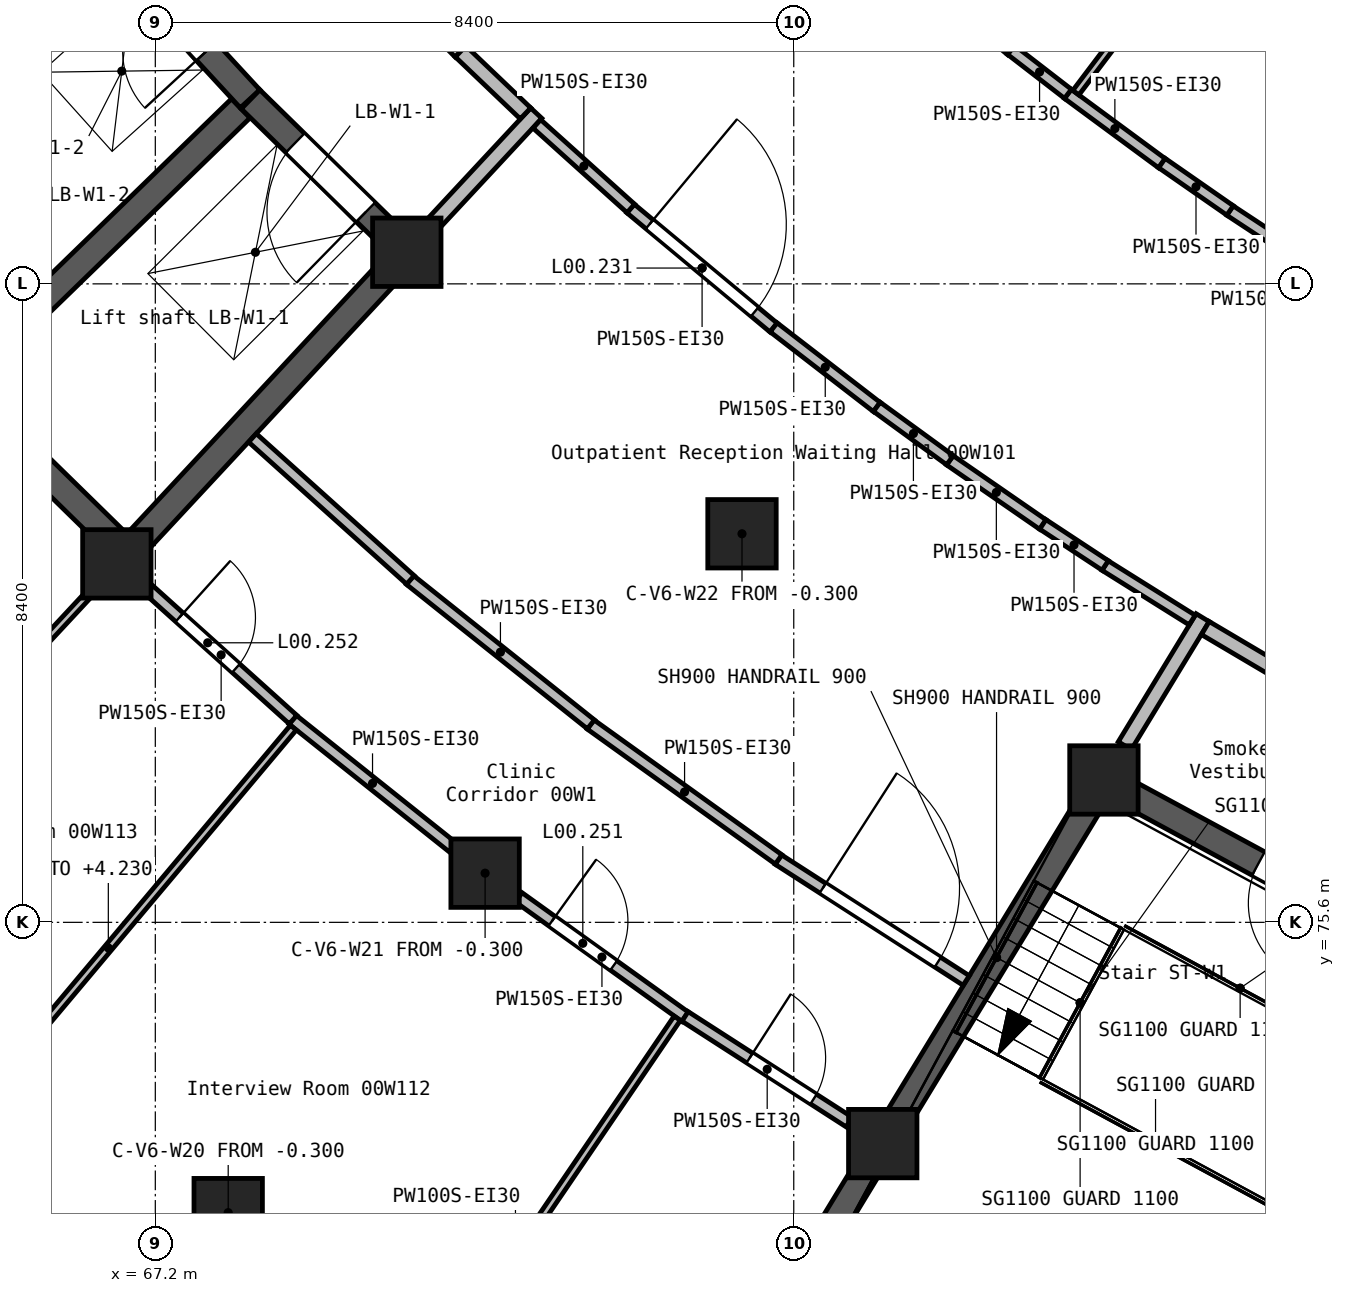
"""IFC4 building model, lengths in metres.
Left out: names, types, materials, properties, quantities, classifications, styles, units other than length and angle.
Written with IfcOpenShell. Run it as: python <this file> out.ifc"""

import sys

from ifc_helpers import new_model, si_unit, direction, frame, frame_2d, origin, origin_2d, place, context, subcontext, project, spatial, rectangle, extrude, element, fill, save


model = new_model("IFC4")
c1 = context("Model", 3, precision=1e-05, world=origin(), true_north=direction((0.0, 1.0)))
c2 = subcontext(c1, "Body", "Model", "MODEL_VIEW")
j1 = project(units=[si_unit("LENGTHUNIT", "METRE"), si_unit("PLANEANGLEUNIT", "RADIAN")], contexts=[c1])
p1 = place(None, origin())
s1 = spatial("IfcSite", under=j1, at=p1, CompositionType="ELEMENT")
p2 = place(p1, origin())
s2 = spatial("IfcBuilding", under=s1, at=p2, CompositionType="ELEMENT")
p3 = place(p2, origin())
s3 = spatial("IfcBuildingStorey", under=s2, at=p3, CompositionType="ELEMENT", Elevation=0.0)
for number, where, z_axis, x_axis in (
    (1, (66.694, 80.316, -0.3), (0.0, 0.0, 1.0), (1.0, 0.0, 0.0)),
    (2, (68.159, 71.781, -0.3), (0.0, 0.0, 1.0), (1.0, 0.0, 0.0)),
    (3, (70.509, 84.416, -0.3), (0.0, 0.0, 1.0), (1.0, 0.0, 0.0)),
    (4, (71.539, 76.247, -0.3), (0.0, 0.0, 1.0), (1.0, 0.0, 0.0)),
    (5, (74.919, 80.712, -0.3), (0.0, 0.0, 1.0), (1.0, 0.0, 0.0)),
    (6, (76.771, 72.689, -0.3), (0.0, 0.0, 1.0), (1.0, 0.0, 0.0)),
    (7, (79.681, 77.473, -0.3), (0.0, 0.0, 1.0), (1.0, 0.0, 0.0)),
):
    element("IfcColumn", number, at=place(p3, frame(where, z_axis=z_axis, x_axis=x_axis)), inside=s3, PredefinedType="COLUMN", context=c2, shape_type="SweptSolid", body=[
        extrude(rectangle(XDim=0.9, YDim=0.9, at=origin_2d()), origin(), (0.0, 0.0, 1.0), 5.7),
    ])
p4 = place(p3, frame((62.305, 84.872, -0.3), z_axis=(0.0, 0.0, 1.0), x_axis=(0.751808220443, 0.659381831471, 0.0)))
e8 = element("IfcWall", 8, at=p4, inside=s3, PredefinedType="SHEAR", context=c2, shape_type="SweptSolid", body=[
    extrude(rectangle(XDim=5.75, YDim=0.35, at=frame_2d((2.875, 0.0))), origin(), (0.0, 0.0, 1.0), 5.7),
])
p5 = place(p3, frame((64.579, 82.666, -0.3), z_axis=(0.0, 0.0, 1.0), x_axis=(0.714695816666, -0.699435407769, 0.0)))
e9 = element("IfcWall", 9, at=p5, inside=s3, PredefinedType="SHEAR", context=c2, shape_type="SweptSolid", body=[
    extrude(rectangle(XDim=2.976, YDim=0.35, at=frame_2d((1.488, 0.0))), origin(), (0.0, 0.0, 1.0), 5.7),
])
p6 = place(p3, frame((64.702, 82.791, -0.3), z_axis=(0.0, 0.0, 1.0), x_axis=(0.717400873641, 0.696660596345, 0.0)))
e10 = element("IfcWall", 10, at=p6, inside=s3, PredefinedType="SHEAR", context=c2, shape_type="SweptSolid", body=[
    extrude(rectangle(XDim=5.05, YDim=0.35, at=frame_2d((2.525, 0.0))), origin(), (0.0, 0.0, 1.0), 5.7),
])
p7 = place(p3, frame((66.712, 80.334, -0.3), z_axis=(0.0, 0.0, 1.0), x_axis=(0.681084356202, 0.732204957465, 0.0)))
e11 = element("IfcWall", 11, at=p7, inside=s3, PredefinedType="SHEAR", context=c2, shape_type="SweptSolid", body=[
    extrude(rectangle(XDim=5.75, YDim=0.35, at=frame_2d((2.875, 0.0))), origin(), (0.0, 0.0, 1.0), 5.7),
])
p8 = place(p3, frame((68.447, 86.434, -0.3), z_axis=(0.0, 0.0, 1.0), x_axis=(-0.678058558992, 0.735007884704, 0.0)))
e12 = element("IfcWall", 12, at=p8, inside=s3, PredefinedType="SHEAR", context=c2, shape_type="SweptSolid", body=[
    extrude(rectangle(XDim=2.701, YDim=0.35, at=frame_2d((1.35, 0.0))), origin(), (0.0, 0.0, 1.0), 5.7),
])
p9 = place(p8, frame((0.85, 0.0, 0.3)))
e13 = element("IfcOpeningElement", 13, at=p9, cuts=e12, PredefinedType="OPENING", context=c2, shape_type="SweptSolid", body=[
    extrude(rectangle(XDim=1.1, YDim=2.1, at=frame_2d((0.55, 1.05))), frame((0.0, 0.185, 0.0), z_axis=(0.0, -1.0, 0.0), x_axis=(1.0, 0.0, 0.0)), (0.0, 0.0, 1.0), 0.37),
])
p10 = place(p3, frame((70.384, 84.538, -0.3), z_axis=(0.0, 0.0, 1.0), x_axis=(-0.714701443082, 0.699429658548, 0.0)))
e14 = element("IfcWall", 14, at=p10, inside=s3, PredefinedType="SHEAR", context=c2, shape_type="SweptSolid", body=[
    extrude(rectangle(XDim=2.702, YDim=0.35, at=frame_2d((1.351, 0.0))), origin(), (0.0, 0.0, 1.0), 5.7),
])
p11 = place(p10, frame((0.581, 0.0, 0.3)))
e15 = element("IfcOpeningElement", 15, at=p11, cuts=e14, PredefinedType="OPENING", context=c2, shape_type="SweptSolid", body=[
    extrude(rectangle(XDim=1.3, YDim=2.1, at=frame_2d((0.65, 1.05))), frame((0.0, 0.185, 0.0), z_axis=(0.0, -1.0, 0.0), x_axis=(1.0, 0.0, 0.0)), (0.0, 0.0, 1.0), 0.37),
])
p12 = place(p3, frame((75.848, 71.173, -0.3), z_axis=(0.0, 0.0, 1.0), x_axis=(0.51973149438, 0.854329663391, 0.0)))
e16 = element("IfcWall", 16, at=p12, inside=s3, PredefinedType="SHEAR", context=c2, shape_type="SweptSolid", body=[
    extrude(rectangle(XDim=7.55, YDim=0.35, at=frame_2d((3.775, 0.0))), origin(), (0.0, 0.0, 1.0), 5.7),
])
p13 = place(p3, frame((81.572, 68.077, -0.3), z_axis=(0.0, 0.0, 1.0), x_axis=(0.430592498036, 0.90254645345, 0.0)))
e17 = element("IfcWall", 17, at=p13, inside=s3, PredefinedType="SHEAR", context=c2, shape_type="SweptSolid", body=[
    extrude(rectangle(XDim=7.55, YDim=0.35, at=frame_2d((3.775, 0.0))), origin(), (0.0, 0.0, 1.0), 5.7),
])
p14 = place(p3, frame((84.593, 74.816, -0.3), z_axis=(0.0, 0.0, 1.0), x_axis=(-0.879585553739, 0.475740742058, 0.0)))
e18 = element("IfcWall", 18, at=p14, inside=s3, PredefinedType="SHEAR", context=c2, shape_type="SweptSolid", body=[
    extrude(rectangle(XDim=5.409, YDim=0.35, at=frame_2d((2.705, 0.0))), origin(), (0.0, 0.0, 1.0), 5.7),
])
p15 = place(p14, frame((2.174, 0.0, 0.3)))
e19 = element("IfcOpeningElement", 19, at=p15, cuts=e18, PredefinedType="OPENING", context=c2, shape_type="SweptSolid", body=[
    extrude(rectangle(XDim=1.1, YDim=2.1, at=frame_2d((0.55, 1.05))), frame((0.0, 0.185, 0.0), z_axis=(0.0, -1.0, 0.0), x_axis=(1.0, 0.0, 0.0)), (0.0, 0.0, 1.0), 0.37),
])
p16 = place(p3, frame((70.837, 84.769, 0.0), z_axis=(0.0, 0.0, 1.0), x_axis=(0.681244203436, 0.732056237789, 0.0)))
e20 = element("IfcWall", 20, at=p16, inside=s3, PredefinedType="SOLIDWALL", context=c2, shape_type="SweptSolid", body=[
    extrude(rectangle(XDim=2.018, YDim=0.2, at=frame_2d((1.009, 0.0))), origin(), (0.0, 0.0, 1.0), 5.05),
])
p17 = place(p3, frame((79.955, 77.924, 0.0), z_axis=(0.0, 0.0, 1.0), x_axis=(0.519675881268, 0.85436349315, 0.0)))
e21 = element("IfcWall", 21, at=p17, inside=s3, PredefinedType="SOLIDWALL", context=c2, shape_type="SweptSolid", body=[
    extrude(rectangle(XDim=1.972, YDim=0.2, at=frame_2d((0.986, 0.0))), origin(), (0.0, 0.0, 1.0), 5.05),
])
p18 = place(p3, frame((70.101, 88.174, 0.0), z_axis=(0.0, 0.0, 1.0), x_axis=(0.705714994949, -0.708495833371, 0.0)))
e22 = element("IfcWall", 22, at=p18, inside=s3, PredefinedType="SOLIDWALL", context=c2, shape_type="SweptSolid", body=[
    extrude(rectangle(XDim=1.58, YDim=0.2, at=frame_2d((0.79, 0.0))), origin(), (0.0, 0.0, 1.0), 5.05),
])
p19 = place(p18, frame((0.19, 0.0, 0.0)))
e23 = element("IfcOpeningElement", 23, at=p19, cuts=e22, PredefinedType="OPENING", context=c2, shape_type="SweptSolid", body=[
    extrude(rectangle(XDim=1.2, YDim=2.1, at=frame_2d((0.6, 1.05))), frame((0.0, 0.11, 0.0), z_axis=(0.0, -1.0, 0.0), x_axis=(1.0, 0.0, 0.0)), (0.0, 0.0, 1.0), 0.22),
])
p20 = place(p3, frame((81.015, 79.471, 0.0), z_axis=(0.0, 0.0, 1.0), x_axis=(0.860926528214, -0.508729312127, 0.0)))
e24 = element("IfcWall", 24, at=p20, inside=s3, PredefinedType="SOLIDWALL", context=c2, shape_type="SweptSolid", body=[
    extrude(rectangle(XDim=1.379, YDim=0.2, at=frame_2d((0.689, 0.0))), origin(), (0.0, 0.0, 1.0), 5.05),
])
p21 = place(p3, frame((71.217, 87.058, 0.0), z_axis=(0.0, 0.0, 1.0), x_axis=(0.723660671666, -0.6901559478, 0.0)))
e25 = element("IfcWall", 25, at=p21, inside=s3, PredefinedType="SOLIDWALL", context=c2, shape_type="SweptSolid", body=[
    extrude(rectangle(XDim=1.18, YDim=0.2, at=frame_2d((0.59, 0.0))), origin(), (0.0, 0.0, 1.0), 5.05),
])
p22 = place(p3, frame((71.982, 75.929, 0.0), z_axis=(0.0, 0.0, 1.0), x_axis=(0.812329236441, -0.583199118332, 0.0)))
e26 = element("IfcWall", 26, at=p22, inside=s3, PredefinedType="PARTITIONING", context=c2, shape_type="SweptSolid", body=[
    extrude(rectangle(XDim=2.695, YDim=0.15, at=frame_2d((1.347, 0.0))), origin(), (0.0, 0.0, 1.0), 5.05),
])
p23 = place(p22, frame((0.537, 0.0, 0.0)))
e27 = element("IfcOpeningElement", 27, at=p23, cuts=e26, PredefinedType="OPENING", context=c2, shape_type="SweptSolid", body=[
    extrude(rectangle(XDim=1.0, YDim=2.1, at=frame_2d((0.5, 1.05))), frame((0.0, 0.085, 0.0), z_axis=(0.0, -1.0, 0.0), x_axis=(1.0, 0.0, 0.0)), (0.0, 0.0, 1.0), 0.17),
])
p24 = place(p3, frame((69.006, 78.267, 0.0), z_axis=(0.0, 0.0, 1.0), x_axis=(0.781841800916, -0.623476862715, 0.0)))
e28 = element("IfcWall", 28, at=p24, inside=s3, PredefinedType="PARTITIONING", context=c2, shape_type="SweptSolid", body=[
    extrude(rectangle(XDim=2.69, YDim=0.15, at=frame_2d((1.345, 0.0))), origin(), (0.0, 0.0, 1.0), 5.05),
])
p25 = place(p3, frame((74.17, 74.362, 0.0), z_axis=(0.0, 0.0, 1.0), x_axis=(0.840928399131, -0.541146401203, 0.0)))
e29 = element("IfcWall", 29, at=p25, inside=s3, PredefinedType="PARTITIONING", context=c2, shape_type="SweptSolid", body=[
    extrude(rectangle(XDim=2.57, YDim=0.15, at=frame_2d((1.285, 0.0))), origin(), (0.0, 0.0, 1.0), 5.05),
])
p26 = place(p25, frame((1.01, 0.0, 0.0)))
e30 = element("IfcOpeningElement", 30, at=p26, cuts=e29, PredefinedType="OPENING", context=c2, shape_type="SweptSolid", body=[
    extrude(rectangle(XDim=1.0, YDim=2.1, at=frame_2d((0.5, 1.05))), frame((0.0, 0.085, 0.0), z_axis=(0.0, -1.0, 0.0), x_axis=(1.0, 0.0, 0.0)), (0.0, 0.0, 1.0), 0.17),
])
p27 = place(p3, frame((67.12, 79.971, 0.0), z_axis=(0.0, 0.0, 1.0), x_axis=(0.743284610851, -0.668975326355, 0.0)))
e31 = element("IfcWall", 31, at=p27, inside=s3, PredefinedType="PARTITIONING", context=c2, shape_type="SweptSolid", body=[
    extrude(rectangle(XDim=2.546, YDim=0.15, at=frame_2d((1.273, 0.0))), origin(), (0.0, 0.0, 1.0), 5.05),
])
p28 = place(p27, frame((0.535, 0.0, 0.0)))
e32 = element("IfcOpeningElement", 32, at=p28, cuts=e31, PredefinedType="OPENING", context=c2, shape_type="SweptSolid", body=[
    extrude(rectangle(XDim=1.0, YDim=2.1, at=frame_2d((0.5, 1.05))), frame((0.0, 0.085, 0.0), z_axis=(0.0, -1.0, 0.0), x_axis=(1.0, 0.0, 0.0)), (0.0, 0.0, 1.0), 0.17),
])
p29 = place(p3, frame((75.396, 76.427, 0.0), z_axis=(0.0, 0.0, 1.0), x_axis=(0.840919451001, -0.541160306128, 0.0)))
e33 = element("IfcWall", 33, at=p29, inside=s3, PredefinedType="PARTITIONING", context=c2, shape_type="SweptSolid", body=[
    extrude(rectangle(XDim=2.941, YDim=0.15, at=frame_2d((1.47, 0.0))), origin(), (0.0, 0.0, 1.0), 5.05),
])
p30 = place(p29, frame((0.697, 0.0, 0.0)))
e34 = element("IfcOpeningElement", 34, at=p30, cuts=e33, PredefinedType="OPENING", context=c2, shape_type="SweptSolid", body=[
    extrude(rectangle(XDim=1.8, YDim=2.1, at=frame_2d((0.9, 1.05))), frame((0.0, 0.085, 0.0), z_axis=(0.0, -1.0, 0.0), x_axis=(1.0, 0.0, 0.0)), (0.0, 0.0, 1.0), 0.17),
])
for number, where, z_axis, x_axis in (
    (35, (72.926, 78.204, 0.0), (0.0, 0.0, 1.0), (0.812, -0.583, 0.0)),
    (36, (70.55, 80.105, 0.0), (0.0, 0.0, 1.0), (0.782, -0.624, 0.0)),
):
    element("IfcWall", number, at=place(p3, frame(where, z_axis=z_axis, x_axis=x_axis)), inside=s3, PredefinedType="PARTITIONING", context=c2, shape_type="SweptSolid", body=[
        extrude(rectangle(XDim=3.046, YDim=0.15, at=frame_2d((1.523, 0.0))), origin(), (0.0, 0.0, 1.0), 5.05),
    ])
p31 = place(p3, frame((68.478, 81.974, 0.0), z_axis=(0.0, 0.0, 1.0), x_axis=(0.743546016741, -0.66868476952, 0.0)))
e37 = element("IfcWall", 37, at=p31, inside=s3, PredefinedType="PARTITIONING", context=c2, shape_type="SweptSolid", body=[
    extrude(rectangle(XDim=2.795, YDim=0.15, at=frame_2d((1.397, 0.0))), origin(), (0.0, 0.0, 1.0), 5.05),
])
p32 = place(p3, frame((73.452, 84.992, 0.0), z_axis=(0.0, 0.0, 1.0), x_axis=(0.768531506517, -0.639811943849, 0.0)))
e38 = element("IfcWall", 38, at=p32, inside=s3, PredefinedType="PARTITIONING", context=c2, shape_type="SweptSolid", body=[
    extrude(rectangle(XDim=2.45, YDim=0.15, at=frame_2d((1.225, 0.0))), origin(), (0.0, 0.0, 1.0), 5.05),
])
p33 = place(p32, frame((0.325, 0.0, 0.0)))
e39 = element("IfcOpeningElement", 39, at=p33, cuts=e38, PredefinedType="OPENING", context=c2, shape_type="SweptSolid", body=[
    extrude(rectangle(XDim=1.8, YDim=2.1, at=frame_2d((0.9, 1.05))), frame((0.0, 0.085, 0.0), z_axis=(0.0, -1.0, 0.0), x_axis=(1.0, 0.0, 0.0)), (0.0, 0.0, 1.0), 0.17),
])
p34 = place(p3, frame((72.22, 86.105, 0.0), z_axis=(0.0, 0.0, 1.0), x_axis=(0.743337937966, -0.668916070954, 0.0)))
e40 = element("IfcWall", 40, at=p34, inside=s3, PredefinedType="PARTITIONING", context=c2, shape_type="SweptSolid", body=[
    extrude(rectangle(XDim=1.663, YDim=0.15, at=frame_2d((0.832, 0.0))), origin(), (0.0, 0.0, 1.0), 5.05),
])
p35 = place(p3, frame((77.051, 88.236, 0.0), z_axis=(0.0, 0.0, 1.0), x_axis=(0.771517511576, -0.636208086502, 0.0)))
e41 = element("IfcWall", 41, at=p35, inside=s3, PredefinedType="PARTITIONING", context=c2, shape_type="SweptSolid", body=[
    extrude(rectangle(XDim=1.828, YDim=0.15, at=frame_2d((0.914, 0.0))), origin(), (0.0, 0.0, 1.0), 5.05),
])
p36 = place(p3, frame((75.335, 83.428, 0.0), z_axis=(0.0, 0.0, 1.0), x_axis=(0.791538398042, -0.611119435483, 0.0)))
e42 = element("IfcWall", 42, at=p36, inside=s3, PredefinedType="PARTITIONING", context=c2, shape_type="SweptSolid", body=[
    extrude(rectangle(XDim=1.716, YDim=0.15, at=frame_2d((0.858, 0.0))), origin(), (0.0, 0.0, 1.0), 5.05),
])
p37 = place(p3, frame((79.206, 86.5, 0.0), z_axis=(0.0, 0.0, 1.0), x_axis=(0.804960127747, -0.593328907721, 0.0)))
e43 = element("IfcWall", 43, at=p37, inside=s3, PredefinedType="PARTITIONING", context=c2, shape_type="SweptSolid", body=[
    extrude(rectangle(XDim=1.539, YDim=0.15, at=frame_2d((0.77, 0.0))), origin(), (0.0, 0.0, 1.0), 5.05),
])
p38 = place(p3, frame((79.695, 80.295, 0.0), z_axis=(0.0, 0.0, 1.0), x_axis=(0.847541618724, -0.530728936964, 0.0)))
e44 = element("IfcWall", 44, at=p38, inside=s3, PredefinedType="PARTITIONING", context=c2, shape_type="SweptSolid", body=[
    extrude(rectangle(XDim=1.353, YDim=0.15, at=frame_2d((0.676, 0.0))), origin(), (0.0, 0.0, 1.0), 5.05),
])
p39 = place(p3, frame((77.653, 81.68, 0.0), z_axis=(0.0, 0.0, 1.0), x_axis=(0.822646640465, -0.568552992194, 0.0)))
e45 = element("IfcWall", 45, at=p39, inside=s3, PredefinedType="PARTITIONING", context=c2, shape_type="SweptSolid", body=[
    extrude(rectangle(XDim=1.488, YDim=0.15, at=frame_2d((0.744, 0.0))), origin(), (0.0, 0.0, 1.0), 5.05),
])
p40 = place(p3, frame((76.693, 82.382, 0.0), z_axis=(0.0, 0.0, 1.0), x_axis=(0.808088805309, -0.589060678312, 0.0)))
e46 = element("IfcWall", 46, at=p40, inside=s3, PredefinedType="PARTITIONING", context=c2, shape_type="SweptSolid", body=[
    extrude(rectangle(XDim=1.192, YDim=0.15, at=frame_2d((0.596, 0.0))), origin(), (0.0, 0.0, 1.0), 5.05),
])
p41 = place(p3, frame((81.338, 84.965, 0.0), z_axis=(0.0, 0.0, 1.0), x_axis=(0.834958204617, -0.550313362134, 0.0)))
e47 = element("IfcWall", 47, at=p41, inside=s3, PredefinedType="PARTITIONING", context=c2, shape_type="SweptSolid", body=[
    extrude(rectangle(XDim=1.389, YDim=0.15, at=frame_2d((0.695, 0.0))), origin(), (0.0, 0.0, 1.0), 5.05),
])
p42 = place(p3, frame((80.444, 85.589, 0.0), z_axis=(0.0, 0.0, 1.0), x_axis=(0.821096473197, -0.570789437274, 0.0)))
e48 = element("IfcWall", 48, at=p42, inside=s3, PredefinedType="PARTITIONING", context=c2, shape_type="SweptSolid", body=[
    extrude(rectangle(XDim=1.093, YDim=0.15, at=frame_2d((0.546, 0.0))), origin(), (0.0, 0.0, 1.0), 5.05),
])
p43 = place(p3, frame((78.877, 80.836, 0.0), z_axis=(0.0, 0.0, 1.0), x_axis=(0.835209839134, -0.549931381733, 0.0)))
e49 = element("IfcWall", 49, at=p43, inside=s3, PredefinedType="PARTITIONING", context=c2, shape_type="SweptSolid", body=[
    extrude(rectangle(XDim=0.982, YDim=0.15, at=frame_2d((0.491, 0.0))), origin(), (0.0, 0.0, 1.0), 5.05),
])
p44 = place(p3, frame((78.46, 87.077, 0.0), z_axis=(0.0, 0.0, 1.0), x_axis=(0.791671493317, -0.610947008069, 0.0)))
e50 = element("IfcWall", 50, at=p44, inside=s3, PredefinedType="PARTITIONING", context=c2, shape_type="SweptSolid", body=[
    extrude(rectangle(XDim=0.944, YDim=0.15, at=frame_2d((0.472, 0.0))), origin(), (0.0, 0.0, 1.0), 5.05),
])
p45 = place(p3, frame((63.244, 76.607, 0.0), z_axis=(0.0, 0.0, 1.0), x_axis=(0.681263193371, 0.732038565485, 0.0)))
e51 = element("IfcWall", 51, at=p45, inside=s3, PredefinedType="PARTITIONING", context=c2, shape_type="SweptSolid", body=[
    extrude(rectangle(XDim=4.529, YDim=0.1, at=frame_2d((2.265, 0.0))), origin(), (0.0, 0.0, 1.0), 5.05),
])
p46 = place(p3, frame((69.81, 68.079, 0.0), z_axis=(0.0, 0.0, 1.0), x_axis=(0.562401761837, 0.826864111135, 0.0)))
e52 = element("IfcWall", 52, at=p46, inside=s3, PredefinedType="PARTITIONING", context=c2, shape_type="SweptSolid", body=[
    extrude(rectangle(XDim=7.57, YDim=0.1, at=frame_2d((3.785, 0.0))), origin(), (0.0, 0.0, 1.0), 5.05),
])
p47 = place(p3, frame((64.148, 72.366, 0.0), z_axis=(0.0, 0.0, 1.0), x_axis=(0.64315880068, 0.76573282358, 0.0)))
e53 = element("IfcWall", 53, at=p47, inside=s3, PredefinedType="PARTITIONING", context=c2, shape_type="SweptSolid", body=[
    extrude(rectangle(XDim=7.569, YDim=0.1, at=frame_2d((3.784, 0.0))), origin(), (0.0, 0.0, 1.0), 4.23),
])
p48 = place(p3, frame((79.312, 86.515, 0.0), z_axis=(0.0, 0.0, 1.0), x_axis=(0.603588624137, 0.797295912954, 0.0)))
e54 = element("IfcWall", 54, at=p48, inside=s3, PredefinedType="PARTITIONING", context=c2, shape_type="SweptSolid", body=[
    extrude(rectangle(XDim=1.782, YDim=0.1, at=frame_2d((0.891, 0.0))), origin(), (0.0, 0.0, 1.0), 5.05),
])
p49 = place(p30, frame((1.8, 0.0, 0.0), z_axis=(0.0, 0.0, 1.0), x_axis=(-1.0, 0.0, 0.0)))
e55 = element("IfcDoor", 55, at=p49, inside=s3, OperationType="DOUBLE_DOOR_SINGLE_SWING", PredefinedType="DOOR", context=c2, shape_type="SweptSolid", body=[
    extrude(rectangle(XDim=1.8, YDim=2.1, at=frame_2d((0.9, 1.05))), frame((0.0, 0.025, 0.0), z_axis=(0.0, -1.0, 0.0), x_axis=(1.0, 0.0, 0.0)), (0.0, 0.0, 1.0), 0.05),
])
fill(e34, e55)
p50 = place(p33, origin())
e56 = element("IfcDoor", 56, at=p50, inside=s3, OperationType="DOUBLE_DOOR_SINGLE_SWING", PredefinedType="DOOR", context=c2, shape_type="SweptSolid", body=[
    extrude(rectangle(XDim=1.8, YDim=2.1, at=frame_2d((0.9, 1.05))), frame((0.0, 0.025, 0.0), z_axis=(0.0, -1.0, 0.0), x_axis=(1.0, 0.0, 0.0)), (0.0, 0.0, 1.0), 0.05),
])
fill(e39, e56)
p51 = place(p26, frame((1.0, 0.0, 0.0), z_axis=(0.0, 0.0, 1.0), x_axis=(-1.0, 0.0, 0.0)))
e57 = element("IfcDoor", 57, at=p51, inside=s3, OperationType="SINGLE_SWING_LEFT", PredefinedType="DOOR", context=c2, shape_type="SweptSolid", body=[
    extrude(rectangle(XDim=1.0, YDim=2.1, at=frame_2d((0.5, 1.05))), frame((0.0, 0.025, 0.0), z_axis=(0.0, -1.0, 0.0), x_axis=(1.0, 0.0, 0.0)), (0.0, 0.0, 1.0), 0.05),
])
fill(e30, e57)
p52 = place(p23, frame((1.0, 0.0, 0.0), z_axis=(0.0, 0.0, 1.0), x_axis=(-1.0, 0.0, 0.0)))
e58 = element("IfcDoor", 58, at=p52, inside=s3, OperationType="SINGLE_SWING_RIGHT", PredefinedType="DOOR", context=c2, shape_type="SweptSolid", body=[
    extrude(rectangle(XDim=1.0, YDim=2.1, at=frame_2d((0.5, 1.05))), frame((0.0, 0.025, 0.0), z_axis=(0.0, -1.0, 0.0), x_axis=(1.0, 0.0, 0.0)), (0.0, 0.0, 1.0), 0.05),
])
fill(e27, e58)
p53 = place(p28, frame((1.0, 0.0, 0.0), z_axis=(0.0, 0.0, 1.0), x_axis=(-1.0, 0.0, 0.0)))
e59 = element("IfcDoor", 59, at=p53, inside=s3, OperationType="SINGLE_SWING_RIGHT", PredefinedType="DOOR", context=c2, shape_type="SweptSolid", body=[
    extrude(rectangle(XDim=1.0, YDim=2.1, at=frame_2d((0.5, 1.05))), frame((0.0, 0.025, 0.0), z_axis=(0.0, -1.0, 0.0), x_axis=(1.0, 0.0, 0.0)), (0.0, 0.0, 1.0), 0.05),
])
fill(e32, e59)
p54 = place(p15, origin())
e60 = element("IfcDoor", 60, at=p54, inside=s3, OperationType="SINGLE_SWING_RIGHT", PredefinedType="DOOR", context=c2, shape_type="SweptSolid", body=[
    extrude(rectangle(XDim=1.1, YDim=2.1, at=frame_2d((0.55, 1.05))), frame((0.0, 0.025, 0.0), z_axis=(0.0, -1.0, 0.0), x_axis=(1.0, 0.0, 0.0)), (0.0, 0.0, 1.0), 0.05),
])
fill(e19, e60)
p55 = place(p11, origin())
e61 = element("IfcDoor", 61, at=p55, inside=s3, OperationType="DOUBLE_DOOR_SLIDING", PredefinedType="DOOR", context=c2, shape_type="SweptSolid", body=[
    extrude(rectangle(XDim=1.3, YDim=2.1, at=frame_2d((0.65, 1.05))), frame((0.0, 0.025, 0.0), z_axis=(0.0, -1.0, 0.0), x_axis=(1.0, 0.0, 0.0)), (0.0, 0.0, 1.0), 0.05),
])
fill(e15, e61)
p56 = place(p9, origin())
e62 = element("IfcDoor", 62, at=p56, inside=s3, OperationType="DOUBLE_DOOR_SLIDING", PredefinedType="DOOR", context=c2, shape_type="SweptSolid", body=[
    extrude(rectangle(XDim=1.1, YDim=2.1, at=frame_2d((0.55, 1.05))), frame((0.0, 0.025, 0.0), z_axis=(0.0, -1.0, 0.0), x_axis=(1.0, 0.0, 0.0)), (0.0, 0.0, 1.0), 0.05),
])
fill(e13, e62)
save(model, sys.argv[1])
